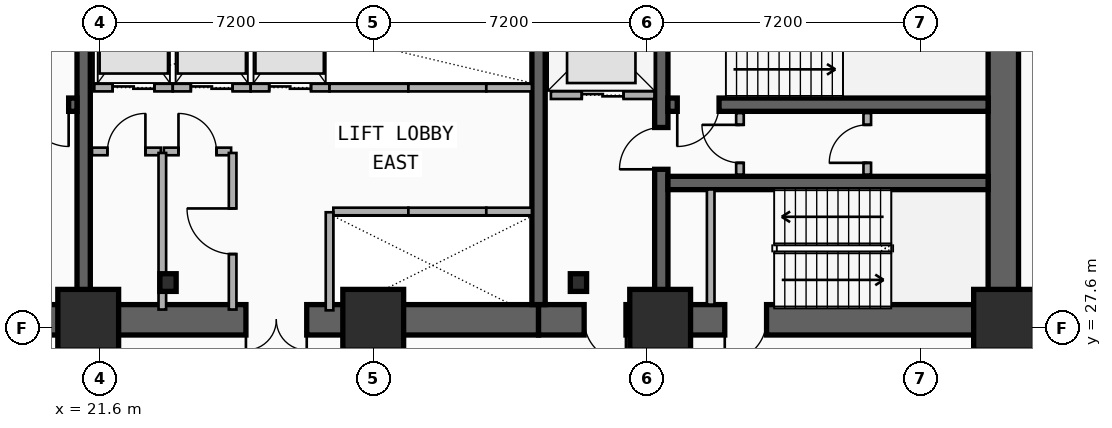
"""IFC4 building model, lengths in metres.
Left out: names, types, materials, properties, quantities, classifications, styles, units other than length and angle.
Written with IfcOpenShell. Run it as: python <this file> out.ifc"""

import sys

from ifc_helpers import new_model, si_unit, direction, frame, frame_2d, origin, origin_2d, place, context, subcontext, project, spatial, rectangle, i_section, extrude, element, fill, save


model = new_model("IFC4")
c1 = context("Model", 3, precision=1e-05, world=origin(), true_north=direction((0.0, 1.0)))
c2 = subcontext(c1, "Body", "Model", "MODEL_VIEW")
j1 = project(units=[si_unit("LENGTHUNIT", "METRE"), si_unit("PLANEANGLEUNIT", "RADIAN")], contexts=[c1])
p1 = place(None, origin())
s1 = spatial("IfcSite", under=j1, at=p1, CompositionType="ELEMENT")
p2 = place(p1, origin())
s2 = spatial("IfcBuilding", under=s1, at=p2, CompositionType="ELEMENT")
p3 = place(p2, frame((0.0, 0.0, 10.4)))
s3 = spatial("IfcBuildingStorey", under=s2, at=p3, CompositionType="ELEMENT", Elevation=10.4)
p4 = place(p3, frame((21.18, 27.82, 0.0), z_axis=(0.0, 0.0, 1.0), x_axis=(-1.0, 0.0, 0.0)))
e1 = element("IfcWall", 1, at=p4, inside=s3, PredefinedType="SHEAR", context=c2, shape_type="SweptSolid", body=[
    extrude(rectangle(XDim=9.03, YDim=0.8, at=frame_2d((4.515, 0.0))), origin(), (0.0, 0.0, 1.0), 4.5),
])
p5 = place(p4, frame((2.68, 0.0, 0.0)))
e2 = element("IfcOpeningElement", 2, at=p5, cuts=e1, PredefinedType="OPENING", context=c2, shape_type="SweptSolid", body=[
    extrude(rectangle(XDim=1.1, YDim=2.15, at=frame_2d((0.55, 1.075))), frame((0.0, 0.41, 0.0), z_axis=(0.0, -1.0, 0.0), x_axis=(1.0, 0.0, 0.0)), (0.0, 0.0, 1.0), 0.82),
])
p6 = place(p3, frame((33.15, 27.82, 0.0), z_axis=(0.0, 0.0, 1.0), x_axis=(-1.0, 0.0, 0.0)))
e3 = element("IfcWall", 3, at=p6, inside=s3, PredefinedType="SHEAR", context=c2, shape_type="SweptSolid", body=[
    extrude(rectangle(XDim=11.97, YDim=0.8, at=frame_2d((5.985, 0.0))), origin(), (0.0, 0.0, 1.0), 4.5),
])
p7 = place(p6, frame((6.1, 0.0, 0.0)))
e4 = element("IfcOpeningElement", 4, at=p7, cuts=e3, PredefinedType="OPENING", context=c2, shape_type="SweptSolid", body=[
    extrude(rectangle(XDim=1.6, YDim=2.2, at=frame_2d((0.8, 1.1))), frame((0.0, 0.41, 0.0), z_axis=(0.0, -1.0, 0.0), x_axis=(1.0, 0.0, 0.0)), (0.0, 0.0, 1.0), 0.82),
])
p8 = place(p3, frame((45.38, 27.82, 0.0), z_axis=(0.0, 0.0, 1.0), x_axis=(-1.0, 0.0, 0.0)))
e5 = element("IfcWall", 5, at=p8, inside=s3, PredefinedType="SHEAR", context=c2, shape_type="SweptSolid", body=[
    extrude(rectangle(XDim=12.23, YDim=0.8, at=frame_2d((6.115, 0.0))), origin(), (0.0, 0.0, 1.0), 4.5),
])
p9 = place(p8, frame((9.93, 0.0, 0.0)))
e6 = element("IfcOpeningElement", 6, at=p9, cuts=e5, PredefinedType="OPENING", context=c2, shape_type="SweptSolid", body=[
    extrude(rectangle(XDim=1.1, YDim=2.15, at=frame_2d((0.55, 1.075))), frame((0.0, 0.41, 0.0), z_axis=(0.0, -1.0, 0.0), x_axis=(1.0, 0.0, 0.0)), (0.0, 0.0, 1.0), 0.82),
])
p10 = place(p8, frame((6.23, 0.0, 0.0)))
e7 = element("IfcOpeningElement", 7, at=p10, cuts=e5, PredefinedType="OPENING", context=c2, shape_type="SweptSolid", body=[
    extrude(rectangle(XDim=1.1, YDim=2.15, at=frame_2d((0.55, 1.075))), frame((0.0, 0.41, 0.0), z_axis=(0.0, -1.0, 0.0), x_axis=(1.0, 0.0, 0.0)), (0.0, 0.0, 1.0), 0.82),
])
p11 = place(p3, frame((45.38, 28.22, 0.0), z_axis=(0.0, 0.0, 1.0), x_axis=(0.0, 1.0, 0.0)))
e8 = element("IfcWall", 8, at=p11, inside=s3, PredefinedType="SHEAR", context=c2, shape_type="SweptSolid", body=[
    extrude(rectangle(XDim=8.43, YDim=0.8, at=frame_2d((4.215, 0.0))), origin(), (0.0, 0.0, 1.0), 4.5),
])
for number, where, z_axis, x_axis in (
    (9, (21.18, 28.22, 0.0), (0.0, 0.0, 1.0), (0.0, 1.0, 0.0)),
    (10, (33.15, 28.22, 0.0), (0.0, 0.0, 1.0), (0.0, 1.0, 0.0)),
):
    element("IfcWall", number, at=place(p3, frame(where, z_axis=z_axis, x_axis=x_axis)), inside=s3, PredefinedType="SHEAR", context=c2, shape_type="SweptSolid", body=[
        extrude(rectangle(XDim=8.43, YDim=0.35, at=frame_2d((4.215, 0.0))), origin(), (0.0, 0.0, 1.0), 4.5),
    ])
p12 = place(p3, frame((36.38, 28.22, 0.0), z_axis=(0.0, 0.0, 1.0), x_axis=(0.0, 1.0, 0.0)))
e11 = element("IfcWall", 11, at=p12, inside=s3, PredefinedType="SHEAR", context=c2, shape_type="SweptSolid", body=[
    extrude(rectangle(XDim=8.43, YDim=0.35, at=frame_2d((4.215, 0.0))), origin(), (0.0, 0.0, 1.0), 4.5),
])
p13 = place(p12, frame((3.56, 0.0, 0.0)))
e12 = element("IfcOpeningElement", 12, at=p13, cuts=e11, PredefinedType="OPENING", context=c2, shape_type="SweptSolid", body=[
    extrude(rectangle(XDim=1.1, YDim=2.15, at=frame_2d((0.55, 1.075))), frame((0.0, 0.185, 0.0), z_axis=(0.0, -1.0, 0.0), x_axis=(1.0, 0.0, 0.0)), (0.0, 0.0, 1.0), 0.37),
])
p14 = place(p3, frame((21.005, 33.48, 0.0), z_axis=(0.0, 0.0, 1.0), x_axis=(-1.0, 0.0, 0.0)))
e13 = element("IfcWall", 13, at=p14, inside=s3, PredefinedType="SHEAR", context=c2, shape_type="SweptSolid", body=[
    extrude(rectangle(XDim=8.455, YDim=0.35, at=frame_2d((4.228, 0.0))), origin(), (0.0, 0.0, 1.0), 4.5),
])
p15 = place(p14, frame((0.22, 0.0, 0.0)))
e14 = element("IfcOpeningElement", 14, at=p15, cuts=e13, PredefinedType="OPENING", context=c2, shape_type="SweptSolid", body=[
    extrude(rectangle(XDim=1.1, YDim=2.15, at=frame_2d((0.55, 1.075))), frame((0.0, 0.185, 0.0), z_axis=(0.0, -1.0, 0.0), x_axis=(1.0, 0.0, 0.0)), (0.0, 0.0, 1.0), 0.37),
])
p16 = place(p3, frame((44.98, 33.48, 0.0), z_axis=(0.0, 0.0, 1.0), x_axis=(-1.0, 0.0, 0.0)))
e15 = element("IfcWall", 15, at=p16, inside=s3, PredefinedType="SHEAR", context=c2, shape_type="SweptSolid", body=[
    extrude(rectangle(XDim=8.425, YDim=0.35, at=frame_2d((4.212, 0.0))), origin(), (0.0, 0.0, 1.0), 4.5),
])
p17 = place(p16, frame((7.08, 0.0, 0.0)))
e16 = element("IfcOpeningElement", 16, at=p17, cuts=e15, PredefinedType="OPENING", context=c2, shape_type="SweptSolid", body=[
    extrude(rectangle(XDim=1.1, YDim=2.15, at=frame_2d((0.55, 1.075))), frame((0.0, 0.185, 0.0), z_axis=(0.0, -1.0, 0.0), x_axis=(1.0, 0.0, 0.0)), (0.0, 0.0, 1.0), 0.37),
])
p18 = place(p3, frame((36.555, 31.42, 0.0), z_axis=(0.0, 0.0, 1.0), x_axis=(1.0, 0.0, 0.0)))
e17 = element("IfcWall", 17, at=p18, inside=s3, PredefinedType="SHEAR", context=c2, shape_type="SweptSolid", body=[
    extrude(rectangle(XDim=8.425, YDim=0.35, at=frame_2d((4.212, 0.0))), origin(), (0.0, 0.0, 1.0), 4.5),
])
for number, where, z_axis, x_axis in (
    (18, (23.4, 28.8, 0.0), (0.0, 0.0, 1.0), (1.0, 0.0, 0.0)),
    (19, (34.2, 28.8, 0.0), (0.0, 0.0, 1.0), (1.0, 0.0, 0.0)),
):
    element("IfcColumn", number, at=place(p3, frame(where, z_axis=z_axis, x_axis=x_axis)), inside=s3, PredefinedType="COLUMN", context=c2, shape_type="SweptSolid", body=[
        extrude(i_section(OverallWidth=0.428, OverallDepth=0.465, WebThickness=0.045, FlangeThickness=0.073, FilletRadius=0.015, at=origin_2d()), origin(), (0.0, 0.0, 1.0), 4.5),
    ])
for number, where, z_axis, x_axis in (
    (20, (21.3, 27.82, 0.0), (0.0, 0.0, 1.0), (1.0, 0.0, 0.0)),
    (21, (28.8, 27.82, 0.0), (0.0, 0.0, 1.0), (1.0, 0.0, 0.0)),
    (22, (36.35, 27.82, 0.0), (0.0, 0.0, 1.0), (1.0, 0.0, 0.0)),
    (23, (45.4, 27.82, 0.0), (0.0, 0.0, 1.0), (1.0, 0.0, 0.0)),
):
    element("IfcColumn", number, at=place(p3, frame(where, z_axis=z_axis, x_axis=x_axis)), inside=s3, PredefinedType="COLUMN", context=c2, shape_type="SweptSolid", body=[
        extrude(rectangle(XDim=1.6, YDim=1.6, at=origin_2d()), origin(), (0.0, 0.0, 1.0), 4.5),
    ])
p19 = place(p3, frame((33.475, 33.73, 0.0), z_axis=(0.0, 0.0, 1.0), x_axis=(1.0, 0.0, 0.0)))
e24 = element("IfcWall", 24, at=p19, inside=s3, PredefinedType="PARTITIONING", context=c2, shape_type="SweptSolid", body=[
    extrude(rectangle(XDim=2.725, YDim=0.2, at=frame_2d((1.362, 0.0))), origin(), (0.0, 0.0, 1.0), 3.172),
])
p20 = place(p19, frame((0.812, 0.0, 0.0)))
e25 = element("IfcOpeningElement", 25, at=p20, cuts=e24, PredefinedType="OPENING", context=c2, shape_type="SweptSolid", body=[
    extrude(rectangle(XDim=1.1, YDim=2.15, at=frame_2d((0.55, 1.075))), frame((0.0, 0.11, 0.0), z_axis=(0.0, -1.0, 0.0), x_axis=(1.0, 0.0, 0.0)), (0.0, 0.0, 1.0), 0.22),
])
p21 = place(p3, frame((27.75, 30.67, 0.0), z_axis=(0.0, 0.0, 1.0), x_axis=(1.0, 0.0, 0.0)))
e26 = element("IfcWall", 26, at=p21, inside=s3, PredefinedType="PARTITIONING", context=c2, shape_type="SweptSolid", body=[
    extrude(rectangle(XDim=1.975, YDim=0.2, at=frame_2d((0.988, 0.0))), origin(), (0.0, 0.0, 1.0), 3.172),
])
p22 = place(p3, frame((27.65, 28.07, 0.0), z_axis=(0.0, 0.0, 1.0), x_axis=(0.0, 1.0, 0.0)))
e27 = element("IfcWall", 27, at=p22, inside=s3, PredefinedType="PARTITIONING", context=c2, shape_type="SweptSolid", body=[
    extrude(rectangle(XDim=2.58, YDim=0.2, at=frame_2d((1.29, 0.0))), origin(), (0.0, 0.0, 1.0), 3.172),
])
p23 = place(p3, frame((29.725, 30.67, 0.0), z_axis=(0.0, 0.0, 1.0), x_axis=(1.0, 0.0, 0.0)))
e28 = element("IfcWall", 28, at=p23, inside=s3, PredefinedType="PARTITIONING", context=c2, shape_type="SweptSolid", body=[
    extrude(rectangle(XDim=2.05, YDim=0.2, at=frame_2d((1.025, 0.0))), origin(), (0.0, 0.0, 1.0), 4.2),
])
p24 = place(p3, frame((31.775, 30.67, 0.0), z_axis=(0.0, 0.0, 1.0), x_axis=(1.0, 0.0, 0.0)))
e29 = element("IfcWall", 29, at=p24, inside=s3, PredefinedType="PARTITIONING", context=c2, shape_type="SweptSolid", body=[
    extrude(rectangle(XDim=1.2, YDim=0.2, at=frame_2d((0.6, 0.0))), origin(), (0.0, 0.0, 1.0), 4.2),
])
p25 = place(p3, frame((21.46, 33.93, 0.0), z_axis=(0.0, 0.0, 1.0), x_axis=(1.0, 0.0, 0.0)))
e30 = element("IfcWall", 30, at=p25, inside=s3, PredefinedType="PARTITIONING", context=c2, shape_type="SweptSolid", body=[
    extrude(rectangle(XDim=2.065, YDim=0.2, at=frame_2d((1.032, 0.0))), origin(), (0.0, 0.0, 1.0), 3.172),
])
p26 = place(p25, frame((0.482, 0.0, 0.0)))
e31 = element("IfcOpeningElement", 31, at=p26, cuts=e30, PredefinedType="OPENING", context=c2, shape_type="SweptSolid", body=[
    extrude(rectangle(XDim=1.1, YDim=2.15, at=frame_2d((0.55, 1.075))), frame((0.0, 0.11, 0.0), z_axis=(0.0, -1.0, 0.0), x_axis=(1.0, 0.0, 0.0)), (0.0, 0.0, 1.0), 0.22),
])
p27 = place(p3, frame((23.525, 33.93, 0.0), z_axis=(0.0, 0.0, 1.0), x_axis=(1.0, 0.0, 0.0)))
e32 = element("IfcWall", 32, at=p27, inside=s3, PredefinedType="PARTITIONING", context=c2, shape_type="SweptSolid", body=[
    extrude(rectangle(XDim=2.05, YDim=0.2, at=frame_2d((1.025, 0.0))), origin(), (0.0, 0.0, 1.0), 4.2),
])
p28 = place(p27, frame((0.475, 0.0, 0.0)))
e33 = element("IfcOpeningElement", 33, at=p28, cuts=e32, PredefinedType="OPENING", context=c2, shape_type="SweptSolid", body=[
    extrude(rectangle(XDim=1.1, YDim=2.15, at=frame_2d((0.55, 1.075))), frame((0.0, 0.11, 0.0), z_axis=(0.0, -1.0, 0.0), x_axis=(1.0, 0.0, 0.0)), (0.0, 0.0, 1.0), 0.22),
])
p29 = place(p3, frame((25.575, 33.93, 0.0), z_axis=(0.0, 0.0, 1.0), x_axis=(1.0, 0.0, 0.0)))
e34 = element("IfcWall", 34, at=p29, inside=s3, PredefinedType="PARTITIONING", context=c2, shape_type="SweptSolid", body=[
    extrude(rectangle(XDim=2.075, YDim=0.2, at=frame_2d((1.038, 0.0))), origin(), (0.0, 0.0, 1.0), 4.2),
])
p30 = place(p29, frame((0.488, 0.0, 0.0)))
e35 = element("IfcOpeningElement", 35, at=p30, cuts=e34, PredefinedType="OPENING", context=c2, shape_type="SweptSolid", body=[
    extrude(rectangle(XDim=1.1, YDim=2.15, at=frame_2d((0.55, 1.075))), frame((0.0, 0.11, 0.0), z_axis=(0.0, -1.0, 0.0), x_axis=(1.0, 0.0, 0.0)), (0.0, 0.0, 1.0), 0.22),
])
p31 = place(p3, frame((27.65, 33.93, 0.0), z_axis=(0.0, 0.0, 1.0), x_axis=(1.0, 0.0, 0.0)))
e36 = element("IfcWall", 36, at=p31, inside=s3, PredefinedType="PARTITIONING", context=c2, shape_type="SweptSolid", body=[
    extrude(rectangle(XDim=2.075, YDim=0.2, at=frame_2d((1.038, 0.0))), origin(), (0.0, 0.0, 1.0), 3.172),
])
p32 = place(p3, frame((29.725, 33.93, 0.0), z_axis=(0.0, 0.0, 1.0), x_axis=(1.0, 0.0, 0.0)))
e37 = element("IfcWall", 37, at=p32, inside=s3, PredefinedType="PARTITIONING", context=c2, shape_type="SweptSolid", body=[
    extrude(rectangle(XDim=2.05, YDim=0.2, at=frame_2d((1.025, 0.0))), origin(), (0.0, 0.0, 1.0), 4.2),
])
p33 = place(p3, frame((31.775, 33.93, 0.0), z_axis=(0.0, 0.0, 1.0), x_axis=(1.0, 0.0, 0.0)))
e38 = element("IfcWall", 38, at=p33, inside=s3, PredefinedType="PARTITIONING", context=c2, shape_type="SweptSolid", body=[
    extrude(rectangle(XDim=1.2, YDim=0.2, at=frame_2d((0.6, 0.0))), origin(), (0.0, 0.0, 1.0), 4.2),
])
p34 = place(p3, frame((37.68, 28.22, 0.0), z_axis=(0.0, 0.0, 1.0), x_axis=(0.0, 1.0, 0.0)))
e39 = element("IfcWall", 39, at=p34, inside=s3, PredefinedType="PARTITIONING", context=c2, shape_type="SweptSolid", body=[
    extrude(rectangle(XDim=3.03, YDim=0.2, at=frame_2d((1.515, 0.0))), origin(), (0.0, 0.0, 1.0), 4.2),
])
p35 = place(p3, frame((38.45, 31.64, 0.0), z_axis=(0.0, 0.0, 1.0), x_axis=(0.0, 1.0, 0.0)))
e40 = element("IfcWall", 40, at=p35, inside=s3, PredefinedType="PARTITIONING", context=c2, shape_type="SweptSolid", body=[
    extrude(rectangle(XDim=1.62, YDim=0.2, at=frame_2d((0.81, 0.0))), origin(), (0.0, 0.0, 1.0), 4.2),
])
p36 = place(p35, frame((0.31, 0.0, 0.0)))
e41 = element("IfcOpeningElement", 41, at=p36, cuts=e40, PredefinedType="OPENING", context=c2, shape_type="SweptSolid", body=[
    extrude(rectangle(XDim=1.0, YDim=2.15, at=frame_2d((0.5, 1.075))), frame((0.0, 0.11, 0.0), z_axis=(0.0, -1.0, 0.0), x_axis=(1.0, 0.0, 0.0)), (0.0, 0.0, 1.0), 0.22),
])
p37 = place(p3, frame((41.8, 31.64, 0.0), z_axis=(0.0, 0.0, 1.0), x_axis=(0.0, 1.0, 0.0)))
e42 = element("IfcWall", 42, at=p37, inside=s3, PredefinedType="PARTITIONING", context=c2, shape_type="SweptSolid", body=[
    extrude(rectangle(XDim=1.62, YDim=0.2, at=frame_2d((0.81, 0.0))), origin(), (0.0, 0.0, 1.0), 4.2),
])
p38 = place(p37, frame((0.31, 0.0, 0.0)))
e43 = element("IfcOpeningElement", 43, at=p38, cuts=e42, PredefinedType="OPENING", context=c2, shape_type="SweptSolid", body=[
    extrude(rectangle(XDim=1.0, YDim=2.15, at=frame_2d((0.5, 1.075))), frame((0.0, 0.11, 0.0), z_axis=(0.0, -1.0, 0.0), x_axis=(1.0, 0.0, 0.0)), (0.0, 0.0, 1.0), 0.22),
])
p39 = place(p3, frame((21.4, 32.25, 0.0), z_axis=(0.0, 0.0, 1.0), x_axis=(1.0, 0.0, 0.0)))
e44 = element("IfcWall", 44, at=p39, inside=s3, PredefinedType="PARTITIONING", context=c2, shape_type="SweptSolid", body=[
    extrude(rectangle(XDim=1.81, YDim=0.2, at=frame_2d((0.905, 0.0))), origin(), (0.0, 0.0, 1.0), 3.172),
])
p40 = place(p39, frame((0.405, 0.0, 0.0)))
e45 = element("IfcOpeningElement", 45, at=p40, cuts=e44, PredefinedType="OPENING", context=c2, shape_type="SweptSolid", body=[
    extrude(rectangle(XDim=1.0, YDim=2.15, at=frame_2d((0.5, 1.075))), frame((0.0, 0.11, 0.0), z_axis=(0.0, -1.0, 0.0), x_axis=(1.0, 0.0, 0.0)), (0.0, 0.0, 1.0), 0.22),
])
p41 = place(p3, frame((23.29, 32.25, 0.0), z_axis=(0.0, 0.0, 1.0), x_axis=(1.0, 0.0, 0.0)))
e46 = element("IfcWall", 46, at=p41, inside=s3, PredefinedType="PARTITIONING", context=c2, shape_type="SweptSolid", body=[
    extrude(rectangle(XDim=1.77, YDim=0.2, at=frame_2d((0.885, 0.0))), origin(), (0.0, 0.0, 1.0), 4.2),
])
p42 = place(p41, frame((0.385, 0.0, 0.0)))
e47 = element("IfcOpeningElement", 47, at=p42, cuts=e46, PredefinedType="OPENING", context=c2, shape_type="SweptSolid", body=[
    extrude(rectangle(XDim=1.0, YDim=2.15, at=frame_2d((0.5, 1.075))), frame((0.0, 0.11, 0.0), z_axis=(0.0, -1.0, 0.0), x_axis=(1.0, 0.0, 0.0)), (0.0, 0.0, 1.0), 0.22),
])
p43 = place(p3, frame((25.1, 28.09, 0.0), z_axis=(0.0, 0.0, 1.0), x_axis=(0.0, 1.0, 0.0)))
e48 = element("IfcWall", 48, at=p43, inside=s3, PredefinedType="PARTITIONING", context=c2, shape_type="SweptSolid", body=[
    extrude(rectangle(XDim=4.12, YDim=0.2, at=frame_2d((2.06, 0.0))), origin(), (0.0, 0.0, 1.0), 4.2),
])
p44 = place(p43, frame((1.46, 0.0, 0.0)))
e49 = element("IfcOpeningElement", 49, at=p44, cuts=e48, PredefinedType="OPENING", context=c2, shape_type="SweptSolid", body=[
    extrude(rectangle(XDim=1.2, YDim=2.15, at=frame_2d((0.6, 1.075))), frame((0.0, 0.11, 0.0), z_axis=(0.0, -1.0, 0.0), x_axis=(1.0, 0.0, 0.0)), (0.0, 0.0, 1.0), 0.22),
])
p45 = place(p3, frame((23.25, 28.09, 0.0), z_axis=(0.0, 0.0, 1.0), x_axis=(0.0, 1.0, 0.0)))
e50 = element("IfcWall", 50, at=p45, inside=s3, PredefinedType="PARTITIONING", context=c2, shape_type="SweptSolid", body=[
    extrude(rectangle(XDim=4.12, YDim=0.2, at=frame_2d((2.06, 0.0))), origin(), (0.0, 0.0, 1.0), 4.2),
])
p46 = place(p3, frame((45.41, 27.6, 0.0), z_axis=(0.0, 0.0, 1.0), x_axis=(1.0, 0.0, 0.0)))
e51 = element("IfcWall", 51, at=p46, inside=s3, PredefinedType="PARTITIONING", context=c2, shape_type="SweptSolid", body=[
    extrude(rectangle(XDim=0.91, YDim=0.16, at=frame_2d((0.455, 0.0))), origin(), (0.0, 0.0, 1.0), 3.172),
])
p47 = place(p20, origin())
e52 = element("IfcDoor", 52, at=p47, inside=s3, OperationType="DOUBLE_DOOR_SLIDING", PredefinedType="DOOR", context=c2, shape_type="SweptSolid", body=[
    extrude(rectangle(XDim=1.1, YDim=2.15, at=frame_2d((0.55, 1.075))), frame((0.0, 0.025, 0.0), z_axis=(0.0, -1.0, 0.0), x_axis=(1.0, 0.0, 0.0)), (0.0, 0.0, 1.0), 0.05),
])
fill(e25, e52)
p48 = place(p26, origin())
e53 = element("IfcDoor", 53, at=p48, inside=s3, OperationType="DOUBLE_DOOR_SLIDING", PredefinedType="DOOR", context=c2, shape_type="SweptSolid", body=[
    extrude(rectangle(XDim=1.1, YDim=2.15, at=frame_2d((0.55, 1.075))), frame((0.0, 0.025, 0.0), z_axis=(0.0, -1.0, 0.0), x_axis=(1.0, 0.0, 0.0)), (0.0, 0.0, 1.0), 0.05),
])
fill(e31, e53)
p49 = place(p28, origin())
e54 = element("IfcDoor", 54, at=p49, inside=s3, OperationType="DOUBLE_DOOR_SLIDING", PredefinedType="DOOR", context=c2, shape_type="SweptSolid", body=[
    extrude(rectangle(XDim=1.1, YDim=2.15, at=frame_2d((0.55, 1.075))), frame((0.0, 0.025, 0.0), z_axis=(0.0, -1.0, 0.0), x_axis=(1.0, 0.0, 0.0)), (0.0, 0.0, 1.0), 0.05),
])
fill(e33, e54)
p50 = place(p30, origin())
e55 = element("IfcDoor", 55, at=p50, inside=s3, OperationType="DOUBLE_DOOR_SLIDING", PredefinedType="DOOR", context=c2, shape_type="SweptSolid", body=[
    extrude(rectangle(XDim=1.1, YDim=2.15, at=frame_2d((0.55, 1.075))), frame((0.0, 0.025, 0.0), z_axis=(0.0, -1.0, 0.0), x_axis=(1.0, 0.0, 0.0)), (0.0, 0.0, 1.0), 0.05),
])
fill(e35, e55)
p51 = place(p15, origin())
e56 = element("IfcDoor", 56, at=p51, inside=s3, OperationType="SINGLE_SWING_LEFT", PredefinedType="DOOR", context=c2, shape_type="SweptSolid", body=[
    extrude(rectangle(XDim=1.1, YDim=2.15, at=frame_2d((0.55, 1.075))), frame((0.0, 0.025, 0.0), z_axis=(0.0, -1.0, 0.0), x_axis=(1.0, 0.0, 0.0)), (0.0, 0.0, 1.0), 0.05),
])
fill(e14, e56)
p52 = place(p17, origin())
e57 = element("IfcDoor", 57, at=p52, inside=s3, OperationType="SINGLE_SWING_RIGHT", PredefinedType="DOOR", context=c2, shape_type="SweptSolid", body=[
    extrude(rectangle(XDim=1.1, YDim=2.15, at=frame_2d((0.55, 1.075))), frame((0.0, 0.025, 0.0), z_axis=(0.0, -1.0, 0.0), x_axis=(1.0, 0.0, 0.0)), (0.0, 0.0, 1.0), 0.05),
])
fill(e16, e57)
p53 = place(p13, origin())
e58 = element("IfcDoor", 58, at=p53, inside=s3, OperationType="SINGLE_SWING_LEFT", PredefinedType="DOOR", context=c2, shape_type="SweptSolid", body=[
    extrude(rectangle(XDim=1.1, YDim=2.15, at=frame_2d((0.55, 1.075))), frame((0.0, 0.025, 0.0), z_axis=(0.0, -1.0, 0.0), x_axis=(1.0, 0.0, 0.0)), (0.0, 0.0, 1.0), 0.05),
])
fill(e12, e58)
p54 = place(p9, origin())
e59 = element("IfcDoor", 59, at=p54, inside=s3, OperationType="SINGLE_SWING_LEFT", PredefinedType="DOOR", context=c2, shape_type="SweptSolid", body=[
    extrude(rectangle(XDim=1.1, YDim=2.15, at=frame_2d((0.55, 1.075))), frame((0.0, 0.025, 0.0), z_axis=(0.0, -1.0, 0.0), x_axis=(1.0, 0.0, 0.0)), (0.0, 0.0, 1.0), 0.05),
])
fill(e6, e59)
p55 = place(p10, origin())
e60 = element("IfcDoor", 60, at=p55, inside=s3, OperationType="SINGLE_SWING_RIGHT", PredefinedType="DOOR", context=c2, shape_type="SweptSolid", body=[
    extrude(rectangle(XDim=1.1, YDim=2.15, at=frame_2d((0.55, 1.075))), frame((0.0, 0.025, 0.0), z_axis=(0.0, -1.0, 0.0), x_axis=(1.0, 0.0, 0.0)), (0.0, 0.0, 1.0), 0.05),
])
fill(e7, e60)
p56 = place(p7, origin())
e61 = element("IfcDoor", 61, at=p56, inside=s3, OperationType="SINGLE_SWING_LEFT", PredefinedType="DOOR", context=c2, shape_type="SweptSolid", body=[
    extrude(rectangle(XDim=1.6, YDim=2.2, at=frame_2d((0.8, 1.1))), frame((0.0, 0.025, 0.0), z_axis=(0.0, -1.0, 0.0), x_axis=(1.0, 0.0, 0.0)), (0.0, 0.0, 1.0), 0.05),
])
fill(e4, e61)
p57 = place(p36, origin())
e62 = element("IfcDoor", 62, at=p57, inside=s3, OperationType="SINGLE_SWING_RIGHT", PredefinedType="DOOR", context=c2, shape_type="SweptSolid", body=[
    extrude(rectangle(XDim=1.0, YDim=2.15, at=frame_2d((0.5, 1.075))), frame((0.0, 0.025, 0.0), z_axis=(0.0, -1.0, 0.0), x_axis=(1.0, 0.0, 0.0)), (0.0, 0.0, 1.0), 0.05),
])
fill(e41, e62)
p58 = place(p38, origin())
e63 = element("IfcDoor", 63, at=p58, inside=s3, OperationType="SINGLE_SWING_LEFT", PredefinedType="DOOR", context=c2, shape_type="SweptSolid", body=[
    extrude(rectangle(XDim=1.0, YDim=2.15, at=frame_2d((0.5, 1.075))), frame((0.0, 0.025, 0.0), z_axis=(0.0, -1.0, 0.0), x_axis=(1.0, 0.0, 0.0)), (0.0, 0.0, 1.0), 0.05),
])
fill(e43, e63)
p59 = place(p40, origin())
e64 = element("IfcDoor", 64, at=p59, inside=s3, OperationType="SINGLE_SWING_RIGHT", PredefinedType="DOOR", context=c2, shape_type="SweptSolid", body=[
    extrude(rectangle(XDim=1.0, YDim=2.15, at=frame_2d((0.5, 1.075))), frame((0.0, 0.025, 0.0), z_axis=(0.0, -1.0, 0.0), x_axis=(1.0, 0.0, 0.0)), (0.0, 0.0, 1.0), 0.05),
])
fill(e45, e64)
p60 = place(p42, origin())
e65 = element("IfcDoor", 65, at=p60, inside=s3, OperationType="SINGLE_SWING_LEFT", PredefinedType="DOOR", context=c2, shape_type="SweptSolid", body=[
    extrude(rectangle(XDim=1.0, YDim=2.15, at=frame_2d((0.5, 1.075))), frame((0.0, 0.025, 0.0), z_axis=(0.0, -1.0, 0.0), x_axis=(1.0, 0.0, 0.0)), (0.0, 0.0, 1.0), 0.05),
])
fill(e47, e65)
p61 = place(p44, origin())
e66 = element("IfcDoor", 66, at=p61, inside=s3, OperationType="SINGLE_SWING_RIGHT", PredefinedType="DOOR", context=c2, shape_type="SweptSolid", body=[
    extrude(rectangle(XDim=1.2, YDim=2.15, at=frame_2d((0.6, 1.075))), frame((0.0, 0.025, 0.0), z_axis=(0.0, -1.0, 0.0), x_axis=(1.0, 0.0, 0.0)), (0.0, 0.0, 1.0), 0.05),
])
fill(e49, e66)
save(model, sys.argv[1])
